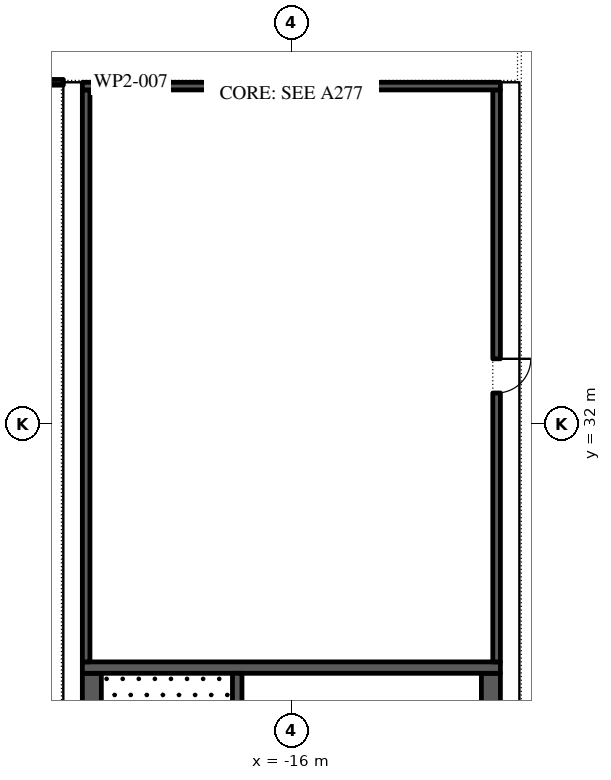
"""IFC4 building model, lengths in metres.
Left out: names, types, materials, properties, quantities, classifications, styles, units other than length and angle.
Written with IfcOpenShell. Run it as: python <this file> out.ifc"""

import sys

from ifc_helpers import new_model, si_unit, direction, frame, frame_2d, origin, place, context, subcontext, project, spatial, rectangle, extrude, element, fill, save


model = new_model("IFC4")
c1 = context("Model", 3, precision=1e-05, world=origin(), true_north=direction((0.0, 1.0)))
c2 = subcontext(c1, "Body", "Model", "MODEL_VIEW")
j1 = project(units=[si_unit("LENGTHUNIT", "METRE"), si_unit("PLANEANGLEUNIT", "RADIAN")], contexts=[c1])
p1 = place(None, origin())
s1 = spatial("IfcSite", under=j1, at=p1, CompositionType="ELEMENT")
p2 = place(p1, origin())
s2 = spatial("IfcBuilding", under=s1, at=p2, CompositionType="ELEMENT")
p3 = place(p2, frame((0.0, 0.0, 338.4)))
s3 = spatial("IfcBuildingStorey", under=s2, at=p3, CompositionType="ELEMENT", Elevation=338.4)
p4 = place(p3, frame((-21.25, -2.45, 0.0), z_axis=(0.0, 0.0, 1.0), x_axis=(0.0, 1.0, 0.0)))
e1 = element("IfcWall", 1, at=p4, inside=s3, PredefinedType="SHEAR", context=c2, shape_type="SweptSolid", body=[
    extrude(rectangle(XDim=27.9, YDim=0.5, at=frame_2d((13.95, 0.0))), origin(), (0.0, 0.0, 1.0), 4.0),
])
p5 = place(p4, frame((5.05, 0.0, 0.0)))
e2 = element("IfcOpeningElement", 2, at=p5, cuts=e1, PredefinedType="OPENING", context=c2, shape_type="SweptSolid", body=[
    extrude(rectangle(XDim=1.2, YDim=2.1, at=frame_2d((0.6, 1.05))), frame((0.0, 0.26, 0.0), z_axis=(0.0, -1.0, 0.0), x_axis=(1.0, 0.0, 0.0)), (0.0, 0.0, 1.0), 0.52),
])
p6 = place(p4, frame((21.65, 0.0, 0.0)))
e3 = element("IfcOpeningElement", 3, at=p6, cuts=e1, PredefinedType="OPENING", context=c2, shape_type="SweptSolid", body=[
    extrude(rectangle(XDim=1.2, YDim=2.1, at=frame_2d((0.6, 1.05))), frame((0.0, 0.26, 0.0), z_axis=(0.0, -1.0, 0.0), x_axis=(1.0, 0.0, 0.0)), (0.0, 0.0, 1.0), 0.52),
])
p7 = place(p3, frame((-10.75, -2.45, 0.0), z_axis=(0.0, 0.0, 1.0), x_axis=(0.0, 1.0, 0.0)))
e4 = element("IfcWall", 4, at=p7, inside=s3, PredefinedType="SHEAR", context=c2, shape_type="SweptSolid", body=[
    extrude(rectangle(XDim=27.9, YDim=0.5, at=frame_2d((13.95, 0.0))), origin(), (0.0, 0.0, 1.0), 4.0),
])
p8 = place(p7, frame((23.65, 0.0, 0.0)))
e5 = element("IfcOpeningElement", 5, at=p8, cuts=e4, PredefinedType="OPENING", context=c2, shape_type="SweptSolid", body=[
    extrude(rectangle(XDim=2.4, YDim=2.1, at=frame_2d((1.2, 1.05))), frame((0.0, 0.26, 0.0), z_axis=(0.0, -1.0, 0.0), x_axis=(1.0, 0.0, 0.0)), (0.0, 0.0, 1.0), 0.52),
])
p9 = place(p7, frame((0.788, 0.0, 0.0)))
e6 = element("IfcOpeningElement", 6, at=p9, cuts=e4, PredefinedType="OPENING", context=c2, shape_type="SweptSolid", body=[
    extrude(rectangle(XDim=0.9, YDim=2.1, at=frame_2d((0.45, 1.05))), frame((0.0, 0.26, 0.0), z_axis=(0.0, -1.0, 0.0), x_axis=(1.0, 0.0, 0.0)), (0.0, 0.0, 1.0), 0.52),
])
p10 = place(p7, frame((3.962, 0.0, 0.0)))
e7 = element("IfcOpeningElement", 7, at=p10, cuts=e4, PredefinedType="OPENING", context=c2, shape_type="SweptSolid", body=[
    extrude(rectangle(XDim=1.0, YDim=2.1, at=frame_2d((0.5, 1.05))), frame((0.0, 0.26, 0.0), z_axis=(0.0, -1.0, 0.0), x_axis=(1.0, 0.0, 0.0)), (0.0, 0.0, 1.0), 0.52),
])
p11 = place(p3, frame((-21.5, 25.6, 0.0), z_axis=(0.0, 0.0, 1.0), x_axis=(1.0, 0.0, 0.0)))
e8 = element("IfcWall", 8, at=p11, inside=s3, PredefinedType="SHEAR", context=c2, shape_type="SweptSolid", body=[
    extrude(rectangle(XDim=11.0, YDim=0.3, at=frame_2d((5.5, 0.0))), origin(), (0.0, 0.0, 1.0), 4.0),
])
p12 = place(p3, frame((-17.425, 19.15, 0.0), z_axis=(0.0, 0.0, 1.0), x_axis=(0.0, 1.0, 0.0)))
e9 = element("IfcWall", 9, at=p12, inside=s3, PredefinedType="SHEAR", context=c2, shape_type="SweptSolid", body=[
    extrude(rectangle(XDim=6.3, YDim=0.25, at=frame_2d((3.15, 0.0))), origin(), (0.0, 0.0, 1.0), 4.0),
])
p13 = place(p12, frame((0.05, 0.0, 0.0)))
e10 = element("IfcOpeningElement", 10, at=p13, cuts=e9, PredefinedType="OPENING", context=c2, shape_type="SweptSolid", body=[
    extrude(rectangle(XDim=1.2, YDim=2.1, at=frame_2d((0.6, 1.05))), frame((0.0, 0.135, 0.0), z_axis=(0.0, -1.0, 0.0), x_axis=(1.0, 0.0, 0.0)), (0.0, 0.0, 1.0), 0.27),
])
p14 = place(p3, frame((-21.4, 25.75, 0.0), z_axis=(0.0, 0.0, 1.0), x_axis=(0.0, 1.0, 0.0)))
e11 = element("IfcWall", 11, at=p14, inside=s3, PredefinedType="SHEAR", context=c2, shape_type="SweptSolid", body=[
    extrude(rectangle(XDim=15.05, YDim=0.2, at=frame_2d((7.525, 0.0))), origin(), (0.0, 0.0, 1.0), 4.0),
])
p15 = place(p3, frame((-10.6, 25.75, 0.0), z_axis=(0.0, 0.0, 1.0), x_axis=(0.0, 1.0, 0.0)))
e12 = element("IfcWall", 12, at=p15, inside=s3, PredefinedType="SHEAR", context=c2, shape_type="SweptSolid", body=[
    extrude(rectangle(XDim=15.05, YDim=0.2, at=frame_2d((7.525, 0.0))), origin(), (0.0, 0.0, 1.0), 4.0),
])
p16 = place(p15, frame((7.075, 0.0, 0.0)))
e13 = element("IfcOpeningElement", 13, at=p16, cuts=e12, PredefinedType="OPENING", context=c2, shape_type="SweptSolid", body=[
    extrude(rectangle(XDim=0.9, YDim=2.1, at=frame_2d((0.45, 1.05))), frame((0.0, 0.11, 0.0), z_axis=(0.0, -1.0, 0.0), x_axis=(1.0, 0.0, 0.0)), (0.0, 0.0, 1.0), 0.22),
])
p17 = place(p3, frame((-21.5, 40.9, 0.0), z_axis=(0.0, 0.0, 1.0), x_axis=(1.0, 0.0, 0.0)))
e14 = element("IfcWall", 14, at=p17, inside=s3, PredefinedType="SHEAR", context=c2, shape_type="SweptSolid", body=[
    extrude(rectangle(XDim=11.0, YDim=0.2, at=frame_2d((5.5, 0.0))), origin(), (0.0, 0.0, 1.0), 4.0),
])
p18 = place(p3, frame((-22.0, 41.0, 0.0), z_axis=(0.0, 0.0, 1.0), x_axis=(-1.0, 0.0, 0.0)))
e15 = element("IfcWall", 15, at=p18, inside=s3, PredefinedType="PARTITIONING", context=c2, shape_type="SweptSolid", body=[
    extrude(rectangle(XDim=4.05, YDim=0.15, at=frame_2d((2.025, 0.0))), origin(), (0.0, 0.0, 1.0), 4.0),
])
p19 = place(p18, frame((2.1, 0.0, 0.0)))
e16 = element("IfcOpeningElement", 16, at=p19, cuts=e15, PredefinedType="OPENING", context=c2, shape_type="SweptSolid", body=[
    extrude(rectangle(XDim=1.0, YDim=2.1, at=frame_2d((0.5, 1.05))), frame((0.0, 0.085, 0.0), z_axis=(0.0, -1.0, 0.0), x_axis=(1.0, 0.0, 0.0)), (0.0, 0.0, 1.0), 0.17),
])
p20 = place(p16, frame((0.9, 0.15, 0.0), z_axis=(0.0, 0.0, 1.0), x_axis=(-1.0, 0.0, 0.0)))
e17 = element("IfcDoor", 17, at=p20, inside=s3, OperationType="SINGLE_SWING_RIGHT", PredefinedType="DOOR", context=c2, shape_type="SweptSolid", body=[
    extrude(rectangle(XDim=0.9, YDim=2.1, at=frame_2d((0.45, 1.05))), frame((0.0, 0.1, 0.0), z_axis=(0.0, -1.0, 0.0), x_axis=(1.0, 0.0, 0.0)), (0.0, 0.0, 1.0), 0.05),
])
fill(e13, e17)
save(model, sys.argv[1])
